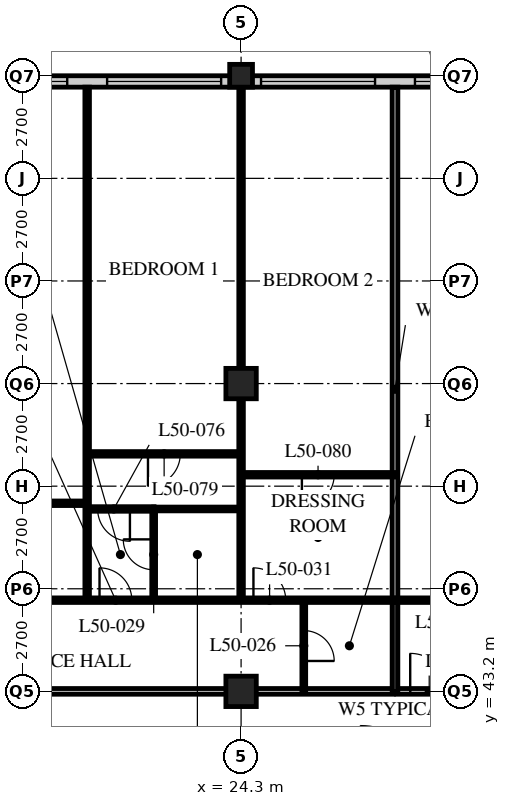
"""IFC4 building model, lengths in metres.
Left out: names, types, materials, properties, quantities, classifications, styles, units other than length and angle.
Written with IfcOpenShell. Run it as: python <this file> out.ifc"""

import sys

from ifc_helpers import new_model, si_unit, direction, frame, frame_2d, origin, origin_2d, place, context, subcontext, project, spatial, rectangle, hollow_rectangle, extrude, element, fill, save


model = new_model("IFC4")
c1 = context("Model", 3, precision=1e-05, world=origin(), true_north=direction((0.0, 1.0)))
c2 = subcontext(c1, "Body", "Model", "MODEL_VIEW")
j1 = project(units=[si_unit("LENGTHUNIT", "METRE"), si_unit("PLANEANGLEUNIT", "RADIAN")], contexts=[c1])
p1 = place(None, origin())
s1 = spatial("IfcSite", under=j1, at=p1, CompositionType="ELEMENT")
p2 = place(p1, origin())
s2 = spatial("IfcBuilding", under=s1, at=p2, CompositionType="ELEMENT")
p3 = place(p2, frame((0.0, 0.0, 195.6)))
s3 = spatial("IfcBuildingStorey", under=s2, at=p3, CompositionType="ELEMENT", Elevation=195.6)
for number, where, z_axis, x_axis in (
    (1, (24.3, 43.2, 0.0), (0.0, 0.0, 1.0), (1.0, 0.0, 0.0)),
    (2, (24.3, 51.3, 0.0), (0.0, 0.0, 1.0), (1.0, 0.0, 0.0)),
):
    element("IfcColumn", number, at=place(p3, frame(where, z_axis=z_axis, x_axis=x_axis)), inside=s3, PredefinedType="COLUMN", context=c2, shape_type="SweptSolid", body=[
        extrude(hollow_rectangle(XDim=0.8, YDim=0.8, WallThickness=0.08, at=origin_2d()), origin(), (0.0, 0.0, 1.0), 3.6),
    ])
p4 = place(p3, frame((24.3, 59.4, 0.0), z_axis=(0.0, 0.0, 1.0), x_axis=(1.0, 0.0, 0.0)))
e3 = element("IfcColumn", 3, at=p4, inside=s3, PredefinedType="COLUMN", context=c2, shape_type="SweptSolid", body=[
    extrude(hollow_rectangle(XDim=0.6, YDim=0.6, WallThickness=0.05, at=origin_2d()), origin(), (0.0, 0.0, 1.0), 3.6),
])
p5 = place(p3, frame((48.3, 59.25, 0.0), z_axis=(0.0, 0.0, 1.0), x_axis=(-1.0, 0.0, 0.0)))
e4 = element("IfcWall", 4, at=p5, inside=s3, PredefinedType="SOLIDWALL", context=c2, shape_type="SweptSolid", body=[
    extrude(rectangle(XDim=40.2, YDim=0.3, at=frame_2d((20.1, 0.0))), origin(), (0.0, 0.0, 1.0), 3.39),
])
p6 = place(p5, frame((0.225, 0.0, 0.6)))
e5 = element("IfcOpeningElement", 5, at=p6, cuts=e4, PredefinedType="OPENING", context=c2, shape_type="SweptSolid", body=[
    extrude(rectangle(XDim=3.0, YDim=2.4, at=frame_2d((1.5, 1.2))), frame((0.0, 0.16, 0.0), z_axis=(0.0, -1.0, 0.0), x_axis=(1.0, 0.0, 0.0)), (0.0, 0.0, 1.0), 0.32),
])
p7 = place(p5, frame((4.275, 0.0, 0.6)))
e6 = element("IfcOpeningElement", 6, at=p7, cuts=e4, PredefinedType="OPENING", context=c2, shape_type="SweptSolid", body=[
    extrude(rectangle(XDim=3.0, YDim=2.4, at=frame_2d((1.5, 1.2))), frame((0.0, 0.16, 0.0), z_axis=(0.0, -1.0, 0.0), x_axis=(1.0, 0.0, 0.0)), (0.0, 0.0, 1.0), 0.32),
])
p8 = place(p5, frame((8.325, 0.0, 0.6)))
e7 = element("IfcOpeningElement", 7, at=p8, cuts=e4, PredefinedType="OPENING", context=c2, shape_type="SweptSolid", body=[
    extrude(rectangle(XDim=3.0, YDim=2.4, at=frame_2d((1.5, 1.2))), frame((0.0, 0.16, 0.0), z_axis=(0.0, -1.0, 0.0), x_axis=(1.0, 0.0, 0.0)), (0.0, 0.0, 1.0), 0.32),
])
p9 = place(p5, frame((12.375, 0.0, 0.6)))
e8 = element("IfcOpeningElement", 8, at=p9, cuts=e4, PredefinedType="OPENING", context=c2, shape_type="SweptSolid", body=[
    extrude(rectangle(XDim=3.0, YDim=2.4, at=frame_2d((1.5, 1.2))), frame((0.0, 0.16, 0.0), z_axis=(0.0, -1.0, 0.0), x_axis=(1.0, 0.0, 0.0)), (0.0, 0.0, 1.0), 0.32),
])
p10 = place(p5, frame((16.425, 0.0, 0.6)))
e9 = element("IfcOpeningElement", 9, at=p10, cuts=e4, PredefinedType="OPENING", context=c2, shape_type="SweptSolid", body=[
    extrude(rectangle(XDim=3.0, YDim=2.4, at=frame_2d((1.5, 1.2))), frame((0.0, 0.16, 0.0), z_axis=(0.0, -1.0, 0.0), x_axis=(1.0, 0.0, 0.0)), (0.0, 0.0, 1.0), 0.32),
])
p11 = place(p5, frame((20.475, 0.0, 0.6)))
e10 = element("IfcOpeningElement", 10, at=p11, cuts=e4, PredefinedType="OPENING", context=c2, shape_type="SweptSolid", body=[
    extrude(rectangle(XDim=3.0, YDim=2.4, at=frame_2d((1.5, 1.2))), frame((0.0, 0.16, 0.0), z_axis=(0.0, -1.0, 0.0), x_axis=(1.0, 0.0, 0.0)), (0.0, 0.0, 1.0), 0.32),
])
p12 = place(p5, frame((24.525, 0.0, 0.6)))
e11 = element("IfcOpeningElement", 11, at=p12, cuts=e4, PredefinedType="OPENING", context=c2, shape_type="SweptSolid", body=[
    extrude(rectangle(XDim=3.0, YDim=2.4, at=frame_2d((1.5, 1.2))), frame((0.0, 0.16, 0.0), z_axis=(0.0, -1.0, 0.0), x_axis=(1.0, 0.0, 0.0)), (0.0, 0.0, 1.0), 0.32),
])
p13 = place(p5, frame((28.575, 0.0, 0.6)))
e12 = element("IfcOpeningElement", 12, at=p13, cuts=e4, PredefinedType="OPENING", context=c2, shape_type="SweptSolid", body=[
    extrude(rectangle(XDim=3.0, YDim=2.4, at=frame_2d((1.5, 1.2))), frame((0.0, 0.16, 0.0), z_axis=(0.0, -1.0, 0.0), x_axis=(1.0, 0.0, 0.0)), (0.0, 0.0, 1.0), 0.32),
])
p14 = place(p5, frame((32.625, 0.0, 0.6)))
e13 = element("IfcOpeningElement", 13, at=p14, cuts=e4, PredefinedType="OPENING", context=c2, shape_type="SweptSolid", body=[
    extrude(rectangle(XDim=3.0, YDim=2.4, at=frame_2d((1.5, 1.2))), frame((0.0, 0.16, 0.0), z_axis=(0.0, -1.0, 0.0), x_axis=(1.0, 0.0, 0.0)), (0.0, 0.0, 1.0), 0.32),
])
p15 = place(p5, frame((36.675, 0.0, 0.6)))
e14 = element("IfcOpeningElement", 14, at=p15, cuts=e4, PredefinedType="OPENING", context=c2, shape_type="SweptSolid", body=[
    extrude(rectangle(XDim=3.0, YDim=2.4, at=frame_2d((1.5, 1.2))), frame((0.0, 0.16, 0.0), z_axis=(0.0, -1.0, 0.0), x_axis=(1.0, 0.0, 0.0)), (0.0, 0.0, 1.0), 0.32),
])
p16 = place(p3, frame((8.1, 43.2, 0.0), z_axis=(0.0, 0.0, 1.0), x_axis=(1.0, 0.0, 0.0)))
e15 = element("IfcWall", 15, at=p16, inside=s3, PredefinedType="PARTITIONING", context=c2, shape_type="SweptSolid", body=[
    extrude(rectangle(XDim=40.5, YDim=0.15, at=frame_2d((20.25, 0.0))), origin(), (0.0, 0.0, 1.0), 2.778),
])
p17 = place(p16, frame((4.45, 0.0, 0.0)))
e16 = element("IfcOpeningElement", 16, at=p17, cuts=e15, PredefinedType="OPENING", context=c2, shape_type="SweptSolid", body=[
    extrude(rectangle(XDim=1.0, YDim=2.1, at=frame_2d((0.5, 1.05))), frame((0.0, 0.085, 0.0), z_axis=(0.0, -1.0, 0.0), x_axis=(1.0, 0.0, 0.0)), (0.0, 0.0, 1.0), 0.17),
])
p18 = place(p16, frame((20.65, 0.0, 0.0)))
e17 = element("IfcOpeningElement", 17, at=p18, cuts=e15, PredefinedType="OPENING", context=c2, shape_type="SweptSolid", body=[
    extrude(rectangle(XDim=1.0, YDim=2.1, at=frame_2d((0.5, 1.05))), frame((0.0, 0.085, 0.0), z_axis=(0.0, -1.0, 0.0), x_axis=(1.0, 0.0, 0.0)), (0.0, 0.0, 1.0), 0.17),
])
p19 = place(p16, frame((28.75, 0.0, 0.0)))
e18 = element("IfcOpeningElement", 18, at=p19, cuts=e15, PredefinedType="OPENING", context=c2, shape_type="SweptSolid", body=[
    extrude(rectangle(XDim=1.0, YDim=2.1, at=frame_2d((0.5, 1.05))), frame((0.0, 0.085, 0.0), z_axis=(0.0, -1.0, 0.0), x_axis=(1.0, 0.0, 0.0)), (0.0, 0.0, 1.0), 0.17),
])
p20 = place(p16, frame((37.975, 0.0, 0.0)))
e19 = element("IfcOpeningElement", 19, at=p20, cuts=e15, PredefinedType="OPENING", context=c2, shape_type="SweptSolid", body=[
    extrude(rectangle(XDim=1.0, YDim=2.1, at=frame_2d((0.5, 1.05))), frame((0.0, 0.085, 0.0), z_axis=(0.0, -1.0, 0.0), x_axis=(1.0, 0.0, 0.0)), (0.0, 0.0, 1.0), 0.17),
])
p21 = place(p16, frame((1.525, 0.0, 0.0)))
e20 = element("IfcOpeningElement", 20, at=p21, cuts=e15, PredefinedType="OPENING", context=c2, shape_type="SweptSolid", body=[
    extrude(rectangle(XDim=1.0, YDim=2.1, at=frame_2d((0.5, 1.05))), frame((0.0, 0.085, 0.0), z_axis=(0.0, -1.0, 0.0), x_axis=(1.0, 0.0, 0.0)), (0.0, 0.0, 1.0), 0.17),
])
p22 = place(p3, frame((25.95, 43.2, 0.0), z_axis=(0.0, 0.0, 1.0), x_axis=(0.0, 1.0, 0.0)))
e21 = element("IfcWall", 21, at=p22, inside=s3, PredefinedType="PARTITIONING", context=c2, shape_type="SweptSolid", body=[
    extrude(rectangle(XDim=2.4, YDim=0.1, at=frame_2d((1.2, 0.0))), origin(), (0.0, 0.0, 1.0), 3.39),
])
p23 = place(p22, frame((0.8, 0.0, 0.0)))
e22 = element("IfcOpeningElement", 22, at=p23, cuts=e21, PredefinedType="OPENING", context=c2, shape_type="SweptSolid", body=[
    extrude(rectangle(XDim=0.8, YDim=2.1, at=frame_2d((0.4, 1.05))), frame((0.0, 0.06, 0.0), z_axis=(0.0, -1.0, 0.0), x_axis=(1.0, 0.0, 0.0)), (0.0, 0.0, 1.0), 0.12),
])
p24 = place(p3, frame((22.0, 45.6, 0.0), z_axis=(0.0, 0.0, 1.0), x_axis=(0.0, 1.0, 0.0)))
e23 = element("IfcWall", 23, at=p24, inside=s3, PredefinedType="PARTITIONING", context=c2, shape_type="SweptSolid", body=[
    extrude(rectangle(XDim=2.4, YDim=0.1, at=frame_2d((1.2, 0.0))), origin(), (0.0, 0.0, 1.0), 3.39),
])
p25 = place(p24, frame((0.8, 0.0, 0.0)))
e24 = element("IfcOpeningElement", 24, at=p25, cuts=e23, PredefinedType="OPENING", context=c2, shape_type="SweptSolid", body=[
    extrude(rectangle(XDim=0.8, YDim=2.1, at=frame_2d((0.4, 1.05))), frame((0.0, 0.06, 0.0), z_axis=(0.0, -1.0, 0.0), x_axis=(1.0, 0.0, 0.0)), (0.0, 0.0, 1.0), 0.12),
])
p26 = place(p3, frame((22.0, 48.0, 0.0), z_axis=(0.0, 0.0, 1.0), x_axis=(1.0, 0.0, 0.0)))
e25 = element("IfcWall", 25, at=p26, inside=s3, PredefinedType="PARTITIONING", context=c2, shape_type="SweptSolid", body=[
    extrude(rectangle(XDim=2.3, YDim=0.1, at=frame_2d((1.15, 0.0))), origin(), (0.0, 0.0, 1.0), 3.39),
])
p27 = place(p3, frame((20.25, 45.6, 0.0), z_axis=(0.0, 0.0, 1.0), x_axis=(0.0, 1.0, 0.0)))
e26 = element("IfcWall", 26, at=p27, inside=s3, PredefinedType="PARTITIONING", context=c2, shape_type="SweptSolid", body=[
    extrude(rectangle(XDim=13.5, YDim=0.12, at=frame_2d((6.75, 0.0))), origin(), (0.0, 0.0, 1.0), 3.39),
])
p28 = place(p3, frame((24.3, 45.6, 0.0), z_axis=(0.0, 0.0, 1.0), x_axis=(0.0, 1.0, 0.0)))
e27 = element("IfcWall", 27, at=p28, inside=s3, PredefinedType="PARTITIONING", context=c2, shape_type="SweptSolid", body=[
    extrude(rectangle(XDim=13.5, YDim=0.12, at=frame_2d((6.75, 0.0))), origin(), (0.0, 0.0, 1.0), 2.778),
])
p29 = place(p3, frame((28.35, 43.2, 0.0), z_axis=(0.0, 0.0, 1.0), x_axis=(0.0, 1.0, 0.0)))
e28 = element("IfcWall", 28, at=p29, inside=s3, PredefinedType="PARTITIONING", context=c2, shape_type="SweptSolid", body=[
    extrude(rectangle(XDim=15.9, YDim=0.15, at=frame_2d((7.95, 0.0))), origin(), (0.0, 0.0, 1.0), 3.39),
])
p30 = place(p3, frame((4.1, 45.6, 0.0), z_axis=(0.0, 0.0, 1.0), x_axis=(1.0, 0.0, 0.0)))
e29 = element("IfcWall", 29, at=p30, inside=s3, PredefinedType="PARTITIONING", context=c2, shape_type="SweptSolid", body=[
    extrude(rectangle(XDim=48.5, YDim=0.12, at=frame_2d((24.25, 0.0))), origin(), (0.0, 0.0, 1.0), 3.39),
])
p31 = place(p30, frame((9.025, 0.0, 0.0)))
e30 = element("IfcOpeningElement", 30, at=p31, cuts=e29, PredefinedType="OPENING", context=c2, shape_type="SweptSolid", body=[
    extrude(rectangle(XDim=0.85, YDim=2.1, at=frame_2d((0.425, 1.05))), frame((0.0, 0.07, 0.0), z_axis=(0.0, -1.0, 0.0), x_axis=(1.0, 0.0, 0.0)), (0.0, 0.0, 1.0), 0.14),
])
p32 = place(p30, frame((16.475, 0.0, 0.0)))
e31 = element("IfcOpeningElement", 31, at=p32, cuts=e29, PredefinedType="OPENING", context=c2, shape_type="SweptSolid", body=[
    extrude(rectangle(XDim=0.85, YDim=2.1, at=frame_2d((0.425, 1.05))), frame((0.0, 0.07, 0.0), z_axis=(0.0, -1.0, 0.0), x_axis=(1.0, 0.0, 0.0)), (0.0, 0.0, 1.0), 0.14),
])
p33 = place(p30, frame((20.525, 0.0, 0.0)))
e32 = element("IfcOpeningElement", 32, at=p33, cuts=e29, PredefinedType="OPENING", context=c2, shape_type="SweptSolid", body=[
    extrude(rectangle(XDim=0.85, YDim=2.1, at=frame_2d((0.425, 1.05))), frame((0.0, 0.07, 0.0), z_axis=(0.0, -1.0, 0.0), x_axis=(1.0, 0.0, 0.0)), (0.0, 0.0, 1.0), 0.14),
])
p34 = place(p30, frame((25.225, 0.0, 0.0)))
e33 = element("IfcOpeningElement", 33, at=p34, cuts=e29, PredefinedType="OPENING", context=c2, shape_type="SweptSolid", body=[
    extrude(rectangle(XDim=0.85, YDim=2.1, at=frame_2d((0.425, 1.05))), frame((0.0, 0.07, 0.0), z_axis=(0.0, -1.0, 0.0), x_axis=(1.0, 0.0, 0.0)), (0.0, 0.0, 1.0), 0.14),
])
p35 = place(p30, frame((28.625, 0.0, 0.0)))
e34 = element("IfcOpeningElement", 34, at=p35, cuts=e29, PredefinedType="OPENING", context=c2, shape_type="SweptSolid", body=[
    extrude(rectangle(XDim=0.85, YDim=2.1, at=frame_2d((0.425, 1.05))), frame((0.0, 0.07, 0.0), z_axis=(0.0, -1.0, 0.0), x_axis=(1.0, 0.0, 0.0)), (0.0, 0.0, 1.0), 0.14),
])
p36 = place(p30, frame((33.325, 0.0, 0.0)))
e35 = element("IfcOpeningElement", 35, at=p36, cuts=e29, PredefinedType="OPENING", context=c2, shape_type="SweptSolid", body=[
    extrude(rectangle(XDim=0.85, YDim=2.1, at=frame_2d((0.425, 1.05))), frame((0.0, 0.07, 0.0), z_axis=(0.0, -1.0, 0.0), x_axis=(1.0, 0.0, 0.0)), (0.0, 0.0, 1.0), 0.14),
])
p37 = place(p30, frame((36.725, 0.0, 0.0)))
e36 = element("IfcOpeningElement", 36, at=p37, cuts=e29, PredefinedType="OPENING", context=c2, shape_type="SweptSolid", body=[
    extrude(rectangle(XDim=0.85, YDim=2.1, at=frame_2d((0.425, 1.05))), frame((0.0, 0.07, 0.0), z_axis=(0.0, -1.0, 0.0), x_axis=(1.0, 0.0, 0.0)), (0.0, 0.0, 1.0), 0.14),
])
p38 = place(p30, frame((40.925, 0.0, 0.0)))
e37 = element("IfcOpeningElement", 37, at=p38, cuts=e29, PredefinedType="OPENING", context=c2, shape_type="SweptSolid", body=[
    extrude(rectangle(XDim=0.85, YDim=2.1, at=frame_2d((0.425, 1.05))), frame((0.0, 0.07, 0.0), z_axis=(0.0, -1.0, 0.0), x_axis=(1.0, 0.0, 0.0)), (0.0, 0.0, 1.0), 0.14),
])
p39 = place(p30, frame((44.775, 0.0, 0.0)))
e38 = element("IfcOpeningElement", 38, at=p39, cuts=e29, PredefinedType="OPENING", context=c2, shape_type="SweptSolid", body=[
    extrude(rectangle(XDim=0.85, YDim=2.1, at=frame_2d((0.425, 1.05))), frame((0.0, 0.07, 0.0), z_axis=(0.0, -1.0, 0.0), x_axis=(1.0, 0.0, 0.0)), (0.0, 0.0, 1.0), 0.14),
])
p40 = place(p30, frame((6.725, 0.0, 0.0)))
e39 = element("IfcOpeningElement", 39, at=p40, cuts=e29, PredefinedType="OPENING", context=c2, shape_type="SweptSolid", body=[
    extrude(rectangle(XDim=0.85, YDim=2.1, at=frame_2d((0.425, 1.05))), frame((0.0, 0.07, 0.0), z_axis=(0.0, -1.0, 0.0), x_axis=(1.0, 0.0, 0.0)), (0.0, 0.0, 1.0), 0.14),
])
p41 = place(p30, frame((2.875, 0.0, 0.0)))
e40 = element("IfcOpeningElement", 40, at=p41, cuts=e29, PredefinedType="OPENING", context=c2, shape_type="SweptSolid", body=[
    extrude(rectangle(XDim=0.85, YDim=2.1, at=frame_2d((0.425, 1.05))), frame((0.0, 0.07, 0.0), z_axis=(0.0, -1.0, 0.0), x_axis=(1.0, 0.0, 0.0)), (0.0, 0.0, 1.0), 0.14),
])
p42 = place(p3, frame((20.25, 48.0, 0.0), z_axis=(0.0, 0.0, 1.0), x_axis=(1.0, 0.0, 0.0)))
e41 = element("IfcWall", 41, at=p42, inside=s3, PredefinedType="PARTITIONING", context=c2, shape_type="SweptSolid", body=[
    extrude(rectangle(XDim=1.76, YDim=0.12, at=frame_2d((0.88, 0.0))), origin(), (0.0, 0.0, 1.0), 3.39),
])
p43 = place(p42, frame((0.275, 0.0, 0.0)))
e42 = element("IfcOpeningElement", 42, at=p43, cuts=e41, PredefinedType="OPENING", context=c2, shape_type="SweptSolid", body=[
    extrude(rectangle(XDim=0.85, YDim=2.1, at=frame_2d((0.425, 1.05))), frame((0.0, 0.07, 0.0), z_axis=(0.0, -1.0, 0.0), x_axis=(1.0, 0.0, 0.0)), (0.0, 0.0, 1.0), 0.14),
])
p44 = place(p3, frame((12.15, 48.15, 0.0), z_axis=(0.0, 0.0, 1.0), x_axis=(1.0, 0.0, 0.0)))
e43 = element("IfcWall", 43, at=p44, inside=s3, PredefinedType="PARTITIONING", context=c2, shape_type="SweptSolid", body=[
    extrude(rectangle(XDim=8.1, YDim=0.12, at=frame_2d((4.05, 0.0))), origin(), (0.0, 0.0, 1.0), 3.39),
])
p45 = place(p44, frame((1.475, 0.0, 0.0)))
e44 = element("IfcOpeningElement", 44, at=p45, cuts=e43, PredefinedType="OPENING", context=c2, shape_type="SweptSolid", body=[
    extrude(rectangle(XDim=0.85, YDim=2.1, at=frame_2d((0.425, 1.05))), frame((0.0, 0.07, 0.0), z_axis=(0.0, -1.0, 0.0), x_axis=(1.0, 0.0, 0.0)), (0.0, 0.0, 1.0), 0.14),
])
p46 = place(p3, frame((20.25, 49.45, 0.0), z_axis=(0.0, 0.0, 1.0), x_axis=(1.0, 0.0, 0.0)))
e45 = element("IfcWall", 45, at=p46, inside=s3, PredefinedType="PARTITIONING", context=c2, shape_type="SweptSolid", body=[
    extrude(rectangle(XDim=4.05, YDim=0.12, at=frame_2d((2.025, 0.0))), origin(), (0.0, 0.0, 1.0), 3.39),
])
p47 = place(p46, frame((1.6, 0.0, 0.0)))
e46 = element("IfcOpeningElement", 46, at=p47, cuts=e45, PredefinedType="OPENING", context=c2, shape_type="SweptSolid", body=[
    extrude(rectangle(XDim=0.85, YDim=2.1, at=frame_2d((0.425, 1.05))), frame((0.0, 0.07, 0.0), z_axis=(0.0, -1.0, 0.0), x_axis=(1.0, 0.0, 0.0)), (0.0, 0.0, 1.0), 0.14),
])
p48 = place(p3, frame((24.3, 48.9, 0.0), z_axis=(0.0, 0.0, 1.0), x_axis=(1.0, 0.0, 0.0)))
e47 = element("IfcWall", 47, at=p48, inside=s3, PredefinedType="PARTITIONING", context=c2, shape_type="SweptSolid", body=[
    extrude(rectangle(XDim=4.05, YDim=0.12, at=frame_2d((2.025, 0.0))), origin(), (0.0, 0.0, 1.0), 3.39),
])
p49 = place(p48, frame((1.6, 0.0, 0.0)))
e48 = element("IfcOpeningElement", 48, at=p49, cuts=e47, PredefinedType="OPENING", context=c2, shape_type="SweptSolid", body=[
    extrude(rectangle(XDim=0.85, YDim=2.1, at=frame_2d((0.425, 1.05))), frame((0.0, 0.07, 0.0), z_axis=(0.0, -1.0, 0.0), x_axis=(1.0, 0.0, 0.0)), (0.0, 0.0, 1.0), 0.14),
])
p50 = place(p10, origin())
e49 = element("IfcWindow", 49, at=p50, inside=s3, PartitioningType="SINGLE_PANEL", PredefinedType="WINDOW", context=c2, shape_type="SweptSolid", body=[
    extrude(rectangle(XDim=3.0, YDim=2.4, at=frame_2d((1.5, 1.2))), frame((0.0, 0.03, 0.0), z_axis=(0.0, -1.0, 0.0), x_axis=(1.0, 0.0, 0.0)), (0.0, 0.0, 1.0), 0.06),
])
fill(e9, e49)
p51 = place(p11, origin())
e50 = element("IfcWindow", 50, at=p51, inside=s3, PartitioningType="SINGLE_PANEL", PredefinedType="WINDOW", context=c2, shape_type="SweptSolid", body=[
    extrude(rectangle(XDim=3.0, YDim=2.4, at=frame_2d((1.5, 1.2))), frame((0.0, 0.03, 0.0), z_axis=(0.0, -1.0, 0.0), x_axis=(1.0, 0.0, 0.0)), (0.0, 0.0, 1.0), 0.06),
])
fill(e10, e50)
p52 = place(p12, origin())
e51 = element("IfcWindow", 51, at=p52, inside=s3, PartitioningType="SINGLE_PANEL", PredefinedType="WINDOW", context=c2, shape_type="SweptSolid", body=[
    extrude(rectangle(XDim=3.0, YDim=2.4, at=frame_2d((1.5, 1.2))), frame((0.0, 0.03, 0.0), z_axis=(0.0, -1.0, 0.0), x_axis=(1.0, 0.0, 0.0)), (0.0, 0.0, 1.0), 0.06),
])
fill(e11, e51)
p53 = place(p13, origin())
e52 = element("IfcWindow", 52, at=p53, inside=s3, PartitioningType="SINGLE_PANEL", PredefinedType="WINDOW", context=c2, shape_type="SweptSolid", body=[
    extrude(rectangle(XDim=3.0, YDim=2.4, at=frame_2d((1.5, 1.2))), frame((0.0, 0.03, 0.0), z_axis=(0.0, -1.0, 0.0), x_axis=(1.0, 0.0, 0.0)), (0.0, 0.0, 1.0), 0.06),
])
fill(e12, e52)
p54 = place(p23, origin())
e53 = element("IfcDoor", 53, at=p54, inside=s3, OperationType="SINGLE_SWING_RIGHT", PredefinedType="DOOR", context=c2, shape_type="SweptSolid", body=[
    extrude(rectangle(XDim=0.8, YDim=2.1, at=frame_2d((0.4, 1.05))), frame((0.0, 0.025, 0.0), z_axis=(0.0, -1.0, 0.0), x_axis=(1.0, 0.0, 0.0)), (0.0, 0.0, 1.0), 0.05),
])
fill(e22, e53)
p55 = place(p25, origin())
e54 = element("IfcDoor", 54, at=p55, inside=s3, OperationType="SINGLE_SWING_RIGHT", PredefinedType="DOOR", context=c2, shape_type="SweptSolid", body=[
    extrude(rectangle(XDim=0.8, YDim=2.1, at=frame_2d((0.4, 1.05))), frame((0.0, 0.025, 0.0), z_axis=(0.0, -1.0, 0.0), x_axis=(1.0, 0.0, 0.0)), (0.0, 0.0, 1.0), 0.05),
])
fill(e24, e54)
p56 = place(p32, origin())
e55 = element("IfcDoor", 55, at=p56, inside=s3, OperationType="SINGLE_SWING_LEFT", PredefinedType="DOOR", context=c2, shape_type="SweptSolid", body=[
    extrude(rectangle(XDim=0.85, YDim=2.1, at=frame_2d((0.425, 1.05))), frame((0.0, 0.025, 0.0), z_axis=(0.0, -1.0, 0.0), x_axis=(1.0, 0.0, 0.0)), (0.0, 0.0, 1.0), 0.05),
])
fill(e31, e55)
p57 = place(p33, origin())
e56 = element("IfcDoor", 56, at=p57, inside=s3, OperationType="SINGLE_SWING_LEFT", PredefinedType="DOOR", context=c2, shape_type="SweptSolid", body=[
    extrude(rectangle(XDim=0.85, YDim=2.1, at=frame_2d((0.425, 1.05))), frame((0.0, 0.025, 0.0), z_axis=(0.0, -1.0, 0.0), x_axis=(1.0, 0.0, 0.0)), (0.0, 0.0, 1.0), 0.05),
])
fill(e32, e56)
p58 = place(p18, origin())
e57 = element("IfcDoor", 57, at=p58, inside=s3, OperationType="SINGLE_SWING_LEFT", PredefinedType="DOOR", context=c2, shape_type="SweptSolid", body=[
    extrude(rectangle(XDim=1.0, YDim=2.1, at=frame_2d((0.5, 1.05))), frame((0.0, 0.025, 0.0), z_axis=(0.0, -1.0, 0.0), x_axis=(1.0, 0.0, 0.0)), (0.0, 0.0, 1.0), 0.05),
])
fill(e17, e57)
p59 = place(p43, origin())
e58 = element("IfcDoor", 58, at=p59, inside=s3, OperationType="SINGLE_SWING_LEFT", PredefinedType="DOOR", context=c2, shape_type="SweptSolid", body=[
    extrude(rectangle(XDim=0.85, YDim=2.1, at=frame_2d((0.425, 1.05))), frame((0.0, 0.025, 0.0), z_axis=(0.0, -1.0, 0.0), x_axis=(1.0, 0.0, 0.0)), (0.0, 0.0, 1.0), 0.05),
])
fill(e42, e58)
p60 = place(p47, origin())
e59 = element("IfcDoor", 59, at=p60, inside=s3, OperationType="SINGLE_SWING_RIGHT", PredefinedType="DOOR", context=c2, shape_type="SweptSolid", body=[
    extrude(rectangle(XDim=0.85, YDim=2.1, at=frame_2d((0.425, 1.05))), frame((0.0, 0.025, 0.0), z_axis=(0.0, -1.0, 0.0), x_axis=(1.0, 0.0, 0.0)), (0.0, 0.0, 1.0), 0.05),
])
fill(e46, e59)
p61 = place(p49, origin())
e60 = element("IfcDoor", 60, at=p61, inside=s3, OperationType="SINGLE_SWING_RIGHT", PredefinedType="DOOR", context=c2, shape_type="SweptSolid", body=[
    extrude(rectangle(XDim=0.85, YDim=2.1, at=frame_2d((0.425, 1.05))), frame((0.0, 0.025, 0.0), z_axis=(0.0, -1.0, 0.0), x_axis=(1.0, 0.0, 0.0)), (0.0, 0.0, 1.0), 0.05),
])
fill(e48, e60)
save(model, sys.argv[1])
